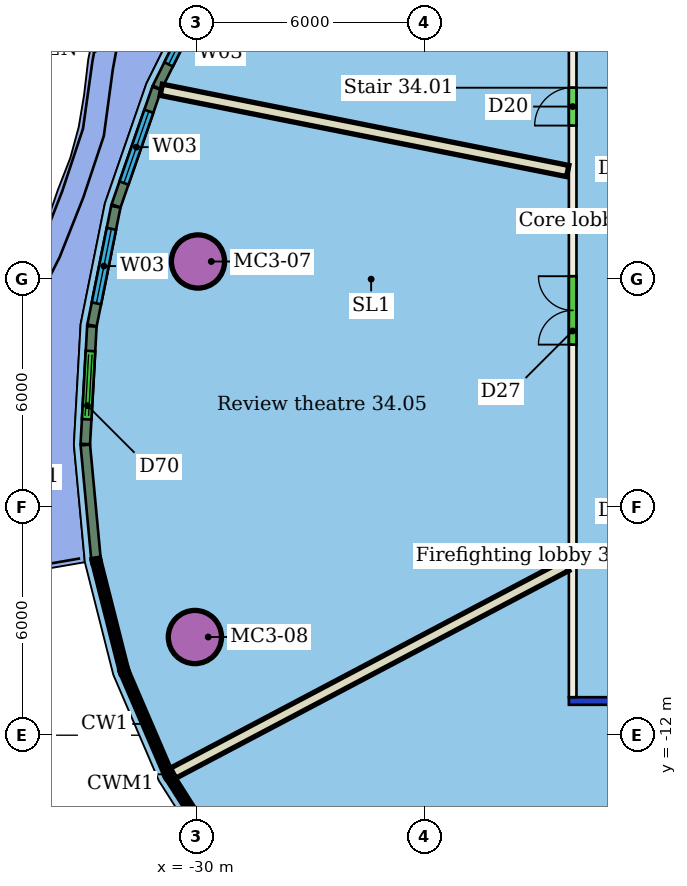
"""IFC4 building model, lengths in metres.
Left out: names, types, materials, properties, quantities, classifications, styles, units other than length and angle.
Written with IfcOpenShell. Run it as: python <this file> out.ifc"""

import sys

from ifc_helpers import new_model, si_unit, direction, frame, frame_2d, origin, origin_2d, place, context, subcontext, project, spatial, rectangle, hollow_circle, extrude, element, fill, save


model = new_model("IFC4")
c1 = context("Model", 3, precision=1e-05, world=origin(), true_north=direction((0.0, 1.0)))
c2 = subcontext(c1, "Body", "Model", "MODEL_VIEW")
j1 = project(units=[si_unit("LENGTHUNIT", "METRE"), si_unit("PLANEANGLEUNIT", "RADIAN")], contexts=[c1])
p1 = place(None, origin())
s1 = spatial("IfcSite", under=j1, at=p1, CompositionType="ELEMENT")
p2 = place(p1, origin())
s2 = spatial("IfcBuilding", under=s1, at=p2, CompositionType="ELEMENT")
p3 = place(p2, frame((0.0, 0.0, 147.0)))
s3 = spatial("IfcBuildingStorey", under=s2, at=p3, CompositionType="ELEMENT", Elevation=147.0)
for number, where, z_axis, x_axis in (
    (1, (-29.959, 0.464, 0.0), (0.0, 0.0, 1.0), (1.0, 0.0, 0.0)),
    (2, (-30.041, -9.417, 0.0), (0.0, 0.0, 1.0), (1.0, 0.0, 0.0)),
):
    element("IfcColumn", number, at=place(p3, frame(where, z_axis=z_axis, x_axis=x_axis)), inside=s3, PredefinedType="COLUMN", context=c2, shape_type="SweptSolid", body=[
        extrude(hollow_circle(Radius=0.7, WallThickness=0.05, at=origin_2d()), origin(), (0.0, 0.0, 1.0), 3.45),
    ])
p4 = place(p3, frame((8.2, -11.1, 0.0), z_axis=(0.0, 0.0, 1.0), x_axis=(-1.0, 0.0, 0.0)))
e3 = element("IfcWall", 3, at=p4, inside=s3, PredefinedType="PARTITIONING", context=c2, shape_type="SweptSolid", body=[
    extrude(rectangle(XDim=28.4, YDim=0.2, at=frame_2d((14.2, 0.0))), origin(), (0.0, 0.0, 1.0), 3.05),
])
p5 = place(p4, frame((22.679, 0.0, 0.0)))
e4 = element("IfcOpeningElement", 4, at=p5, cuts=e3, PredefinedType="OPENING", context=c2, shape_type="SweptSolid", body=[
    extrude(rectangle(XDim=1.8, YDim=2.1, at=frame_2d((0.9, 1.05))), frame((0.0, 0.11, 0.0), z_axis=(0.0, -1.0, 0.0), x_axis=(1.0, 0.0, 0.0)), (0.0, 0.0, 1.0), 0.22),
])
p6 = place(p4, frame((17.359, 0.0, 0.0)))
e5 = element("IfcOpeningElement", 5, at=p6, cuts=e3, PredefinedType="OPENING", context=c2, shape_type="SweptSolid", body=[
    extrude(rectangle(XDim=0.9, YDim=2.1, at=frame_2d((0.45, 1.05))), frame((0.0, 0.11, 0.0), z_axis=(0.0, -1.0, 0.0), x_axis=(1.0, 0.0, 0.0)), (0.0, 0.0, 1.0), 0.22),
])
p7 = place(p4, frame((7.557, 0.0, 0.0)))
e6 = element("IfcOpeningElement", 6, at=p7, cuts=e3, PredefinedType="OPENING", context=c2, shape_type="SweptSolid", body=[
    extrude(rectangle(XDim=1.2, YDim=2.1, at=frame_2d((0.6, 1.05))), frame((0.0, 0.11, 0.0), z_axis=(0.0, -1.0, 0.0), x_axis=(1.0, 0.0, 0.0)), (0.0, 0.0, 1.0), 0.22),
])
p8 = place(p3, frame((-20.1, -11.0, 0.0), z_axis=(0.0, 0.0, 1.0), x_axis=(0.0, 1.0, 0.0)))
e7 = element("IfcWall", 7, at=p8, inside=s3, PredefinedType="PARTITIONING", context=c2, shape_type="SweptSolid", body=[
    extrude(rectangle(XDim=22.0, YDim=0.2, at=frame_2d((11.0, 0.0))), origin(), (0.0, 0.0, 1.0), 3.45),
])
p9 = place(p8, frame((15.041, 0.0, 0.0)))
e8 = element("IfcOpeningElement", 8, at=p9, cuts=e7, PredefinedType="OPENING", context=c2, shape_type="SweptSolid", body=[
    extrude(rectangle(XDim=1.0, YDim=2.1, at=frame_2d((0.5, 1.05))), frame((0.0, 0.11, 0.0), z_axis=(0.0, -1.0, 0.0), x_axis=(1.0, 0.0, 0.0)), (0.0, 0.0, 1.0), 0.22),
])
p10 = place(p8, frame((9.277, 0.0, 0.0)))
e9 = element("IfcOpeningElement", 9, at=p10, cuts=e7, PredefinedType="OPENING", context=c2, shape_type="SweptSolid", body=[
    extrude(rectangle(XDim=1.8, YDim=2.4, at=frame_2d((0.9, 1.2))), frame((0.0, 0.11, 0.0), z_axis=(0.0, -1.0, 0.0), x_axis=(1.0, 0.0, 0.0)), (0.0, 0.0, 1.0), 0.22),
])
p11 = place(p3, frame((-30.925, 4.983, 0.0), z_axis=(0.0, 0.0, 1.0), x_axis=(0.980597889581, -0.196030046039, 0.0)))
e10 = element("IfcWall", 10, at=p11, inside=s3, PredefinedType="PARTITIONING", context=c2, shape_type="SweptSolid", body=[
    extrude(rectangle(XDim=10.907, YDim=0.3, at=frame_2d((5.454, 0.0))), origin(), (0.0, 0.0, 1.0), 3.45),
])
p12 = place(p3, frame((-30.613, -12.999, 0.0), z_axis=(0.0, 0.0, 1.0), x_axis=(0.884254045952, 0.46700619077, 0.0)))
e11 = element("IfcWall", 11, at=p12, inside=s3, PredefinedType="PARTITIONING", context=c2, shape_type="SweptSolid", body=[
    extrude(rectangle(XDim=11.697, YDim=0.3, at=frame_2d((5.849, 0.0))), origin(), (0.0, 0.0, 1.0), 3.45),
])
p13 = place(p3, frame((-29.538, 8.051, 0.0), z_axis=(0.0, 0.0, 1.0), x_axis=(-0.445527727944, -0.895268140633, 0.0)))
e12 = element("IfcWall", 12, at=p13, inside=s3, PredefinedType="SOLIDWALL", context=c2, shape_type="SweptSolid", body=[
    extrude(rectangle(XDim=3.361, YDim=0.25, at=frame_2d((1.681, 0.0))), origin(), (0.0, 0.0, 1.0), 3.1),
])
p14 = place(p13, frame((0.681, 0.0, 0.9)))
e13 = element("IfcOpeningElement", 13, at=p14, cuts=e12, PredefinedType="OPENING", context=c2, shape_type="SweptSolid", body=[
    extrude(rectangle(XDim=2.0, YDim=2.1, at=frame_2d((1.0, 1.05))), frame((0.0, 0.135, 0.0), z_axis=(0.0, -1.0, 0.0), x_axis=(1.0, 0.0, 0.0)), (0.0, 0.0, 1.0), 0.27),
])
p15 = place(p3, frame((-31.044, 5.02, 0.0), z_axis=(0.0, 0.0, 1.0), x_axis=(-0.327287400889, -0.944924842101, 0.0)))
e14 = element("IfcWall", 14, at=p15, inside=s3, PredefinedType="SOLIDWALL", context=c2, shape_type="SweptSolid", body=[
    extrude(rectangle(XDim=3.272, YDim=0.25, at=frame_2d((1.636, 0.0))), origin(), (0.0, 0.0, 1.0), 3.1),
])
p16 = place(p15, frame((0.636, 0.0, 0.9)))
e15 = element("IfcOpeningElement", 15, at=p16, cuts=e14, PredefinedType="OPENING", context=c2, shape_type="SweptSolid", body=[
    extrude(rectangle(XDim=2.0, YDim=2.1, at=frame_2d((1.0, 1.05))), frame((0.0, 0.135, 0.0), z_axis=(0.0, -1.0, 0.0), x_axis=(1.0, 0.0, 0.0)), (0.0, 0.0, 1.0), 0.27),
])
p17 = place(p3, frame((-32.122, 1.904, 0.0), z_axis=(0.0, 0.0, 1.0), x_axis=(-0.196824126918, -0.980438811483, 0.0)))
e16 = element("IfcWall", 16, at=p17, inside=s3, PredefinedType="SOLIDWALL", context=c2, shape_type="SweptSolid", body=[
    extrude(rectangle(XDim=3.183, YDim=0.25, at=frame_2d((1.591, 0.0))), origin(), (0.0, 0.0, 1.0), 3.1),
])
p18 = place(p17, frame((0.591, 0.0, 0.9)))
e17 = element("IfcOpeningElement", 17, at=p18, cuts=e16, PredefinedType="OPENING", context=c2, shape_type="SweptSolid", body=[
    extrude(rectangle(XDim=2.0, YDim=2.1, at=frame_2d((1.0, 1.05))), frame((0.0, 0.135, 0.0), z_axis=(0.0, -1.0, 0.0), x_axis=(1.0, 0.0, 0.0)), (0.0, 0.0, 1.0), 0.27),
])
p19 = place(p3, frame((-32.752, -1.242, 0.0), z_axis=(0.0, 0.0, 1.0), x_axis=(-0.055823234229, -0.998440667501, 0.0)))
e18 = element("IfcWall", 18, at=p19, inside=s3, PredefinedType="SOLIDWALL", context=c2, shape_type="SweptSolid", body=[
    extrude(rectangle(XDim=3.101, YDim=0.25, at=frame_2d((1.55, 0.0))), origin(), (0.0, 0.0, 1.0), 3.1),
])
p20 = place(p19, frame((0.65, 0.0, 0.0)))
e19 = element("IfcOpeningElement", 19, at=p20, cuts=e18, PredefinedType="OPENING", context=c2, shape_type="SweptSolid", body=[
    extrude(rectangle(XDim=1.8, YDim=2.4, at=frame_2d((0.9, 1.2))), frame((0.0, 0.135, 0.0), z_axis=(0.0, -1.0, 0.0), x_axis=(1.0, 0.0, 0.0)), (0.0, 0.0, 1.0), 0.27),
])
p21 = place(p3, frame((-32.924, -4.365, 0.0), z_axis=(0.0, 0.0, 1.0), x_axis=(0.093052449372, -0.995661208276, 0.0)))
e20 = element("IfcWall", 20, at=p21, inside=s3, PredefinedType="SOLIDWALL", context=c2, shape_type="SweptSolid", body=[
    extrude(rectangle(XDim=2.991, YDim=0.25, at=frame_2d((1.496, 0.0))), origin(), (0.0, 0.0, 1.0), 3.1),
])
p22 = place(p9, origin())
e21 = element("IfcDoor", 21, at=p22, inside=s3, OperationType="SINGLE_SWING_LEFT", PredefinedType="DOOR", context=c2, shape_type="SweptSolid", body=[
    extrude(rectangle(XDim=1.0, YDim=2.1, at=frame_2d((0.5, 1.05))), frame((0.0, 0.025, 0.0), z_axis=(0.0, -1.0, 0.0), x_axis=(1.0, 0.0, 0.0)), (0.0, 0.0, 1.0), 0.05),
])
fill(e8, e21)
p23 = place(p10, origin())
e22 = element("IfcDoor", 22, at=p23, inside=s3, OperationType="DOUBLE_DOOR_SINGLE_SWING", PredefinedType="DOOR", context=c2, shape_type="SweptSolid", body=[
    extrude(rectangle(XDim=1.8, YDim=2.4, at=frame_2d((0.9, 1.2))), frame((0.0, 0.025, 0.0), z_axis=(0.0, -1.0, 0.0), x_axis=(1.0, 0.0, 0.0)), (0.0, 0.0, 1.0), 0.05),
])
fill(e9, e22)
p24 = place(p14, origin())
e23 = element("IfcWindow", 23, at=p24, inside=s3, PartitioningType="SINGLE_PANEL", PredefinedType="WINDOW", context=c2, shape_type="SweptSolid", body=[
    extrude(rectangle(XDim=2.0, YDim=2.1, at=frame_2d((1.0, 1.05))), frame((0.0, 0.03, 0.0), z_axis=(0.0, -1.0, 0.0), x_axis=(1.0, 0.0, 0.0)), (0.0, 0.0, 1.0), 0.06),
])
fill(e13, e23)
p25 = place(p16, origin())
e24 = element("IfcWindow", 24, at=p25, inside=s3, PartitioningType="SINGLE_PANEL", PredefinedType="WINDOW", context=c2, shape_type="SweptSolid", body=[
    extrude(rectangle(XDim=2.0, YDim=2.1, at=frame_2d((1.0, 1.05))), frame((0.0, 0.03, 0.0), z_axis=(0.0, -1.0, 0.0), x_axis=(1.0, 0.0, 0.0)), (0.0, 0.0, 1.0), 0.06),
])
fill(e15, e24)
p26 = place(p18, origin())
e25 = element("IfcWindow", 25, at=p26, inside=s3, PartitioningType="SINGLE_PANEL", PredefinedType="WINDOW", context=c2, shape_type="SweptSolid", body=[
    extrude(rectangle(XDim=2.0, YDim=2.1, at=frame_2d((1.0, 1.05))), frame((0.0, 0.03, 0.0), z_axis=(0.0, -1.0, 0.0), x_axis=(1.0, 0.0, 0.0)), (0.0, 0.0, 1.0), 0.06),
])
fill(e17, e25)
p27 = place(p20, origin())
e26 = element("IfcDoor", 26, at=p27, inside=s3, OperationType="DOUBLE_DOOR_SLIDING", PredefinedType="DOOR", context=c2, shape_type="SweptSolid", body=[
    extrude(rectangle(XDim=1.8, YDim=2.4, at=frame_2d((0.9, 1.2))), frame((0.0, 0.025, 0.0), z_axis=(0.0, -1.0, 0.0), x_axis=(1.0, 0.0, 0.0)), (0.0, 0.0, 1.0), 0.05),
])
fill(e19, e26)
save(model, sys.argv[1])
